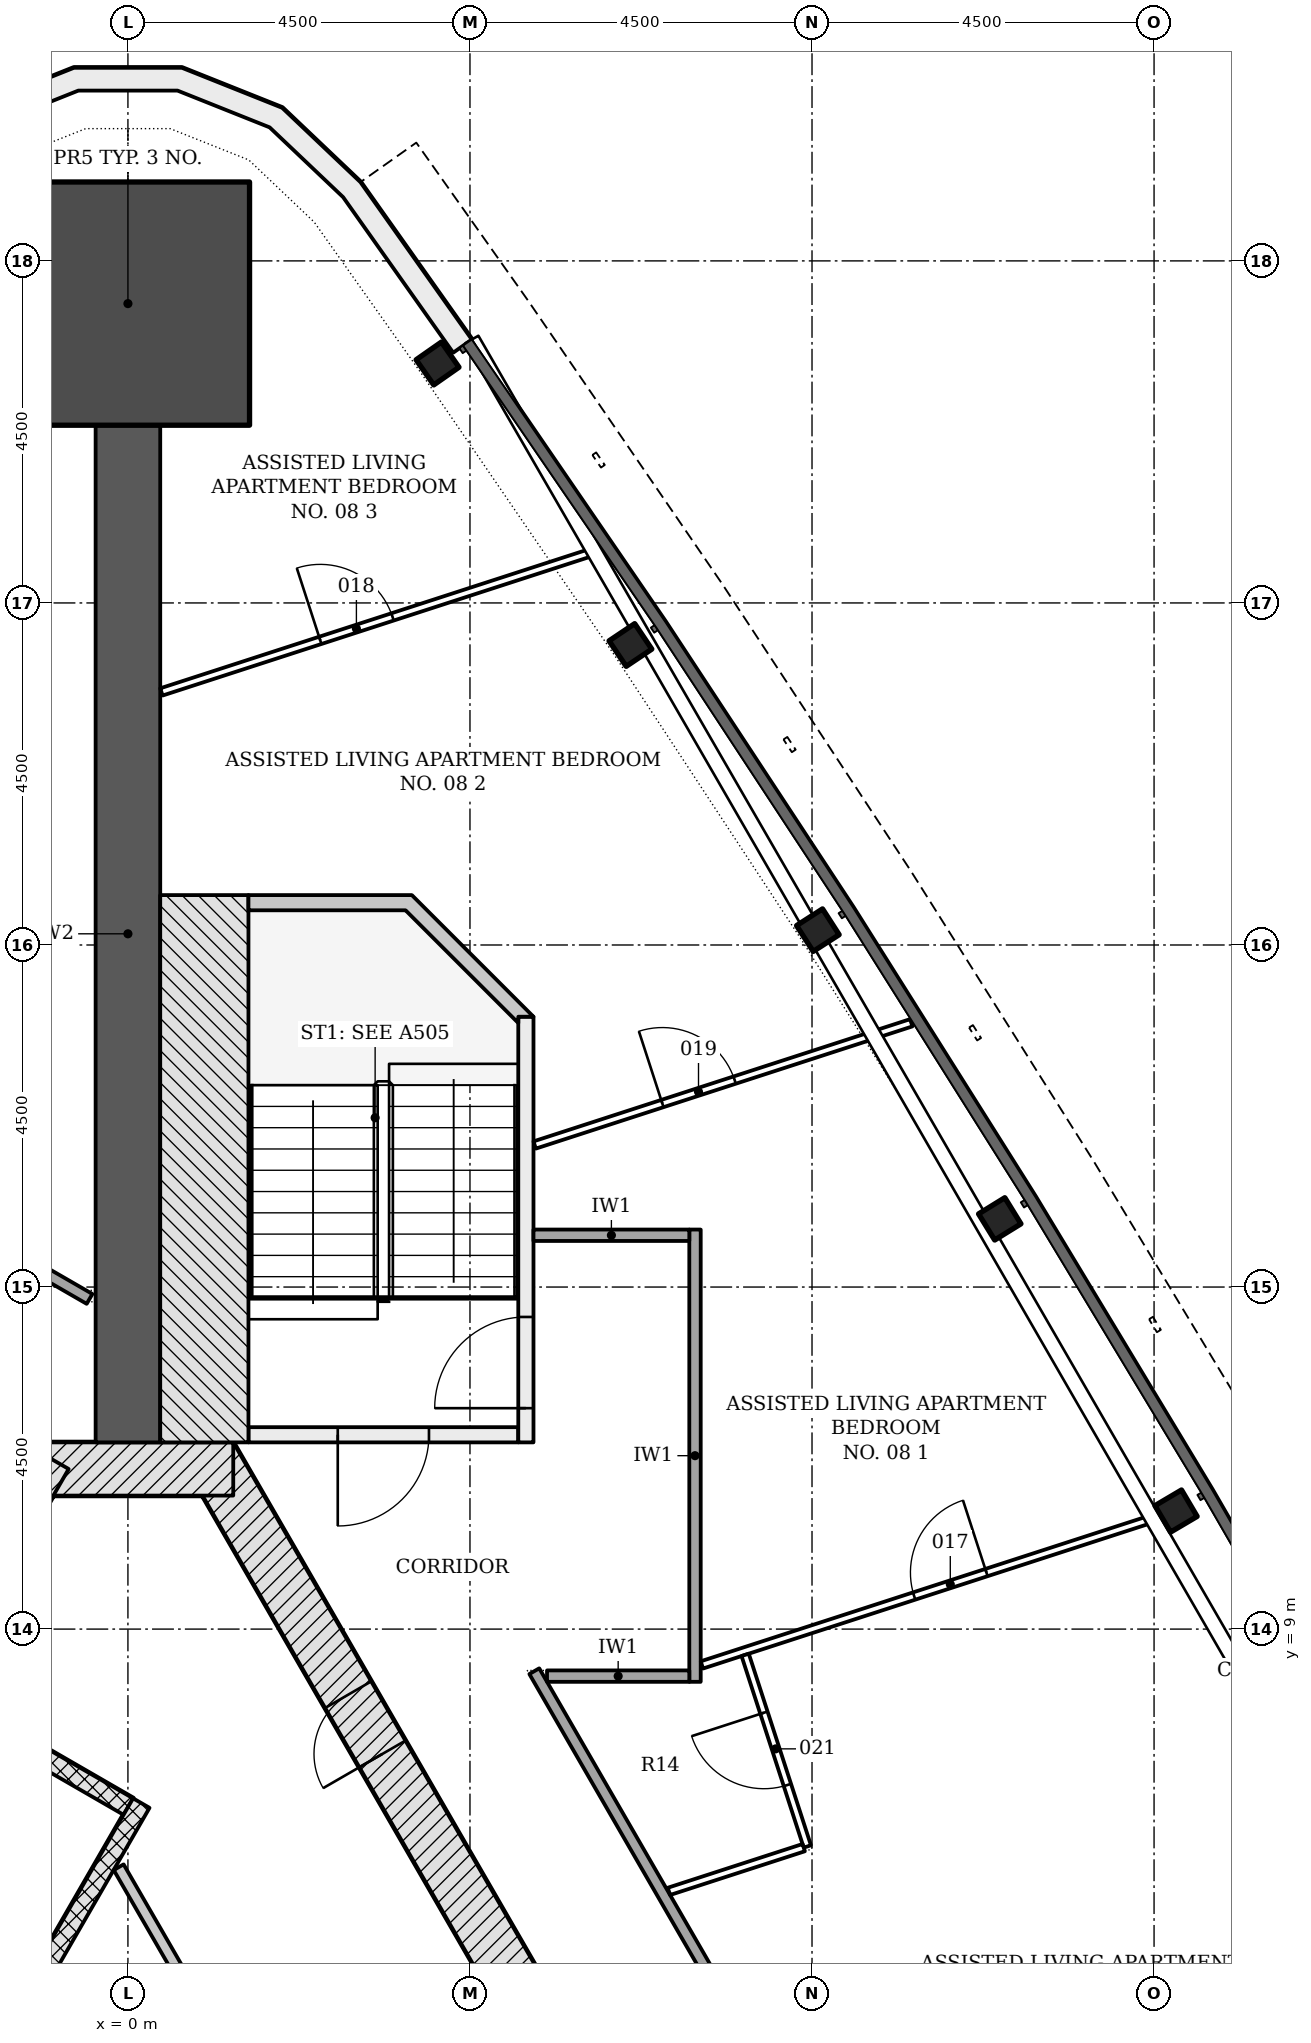
"""IFC4 building model, lengths in metres.
Left out: names, types, materials, properties, quantities, classifications, styles, units other than length and angle.
Written with IfcOpenShell. Run it as: python <this file> out.ifc"""

import sys

from ifc_helpers import new_model, si_unit, direction, frame, frame_2d, origin, origin_2d, place, context, subcontext, project, spatial, polyline, rectangle, i_section, outline, extrude, element, fill, save


model = new_model("IFC4")
c1 = context("Model", 3, precision=1e-05, world=origin(), true_north=direction((0.0, 1.0)))
c2 = subcontext(c1, "Body", "Model", "MODEL_VIEW")
j1 = project(units=[si_unit("LENGTHUNIT", "METRE"), si_unit("PLANEANGLEUNIT", "RADIAN")], contexts=[c1])
p1 = place(None, origin())
s1 = spatial("IfcSite", under=j1, at=p1, CompositionType="ELEMENT")
p2 = place(p1, origin())
s2 = spatial("IfcBuilding", under=s1, at=p2, CompositionType="ELEMENT")
p3 = place(p2, frame((0.0, 0.0, 72.6)))
s3 = spatial("IfcBuildingStorey", under=s2, at=p3, CompositionType="ELEMENT", Elevation=72.6)
p4 = place(p3, frame((10.311, -4.703, -0.2), z_axis=(0.0, 0.0, 1.0), x_axis=(-0.500001446645, 0.866024568562, 0.0)))
e1 = element("IfcWall", 1, at=p4, inside=s3, PredefinedType="SHEAR", context=c2, shape_type="SweptSolid", body=[
    extrude(rectangle(XDim=18.458, YDim=0.7, at=frame_2d((9.229, 0.0))), origin(), (0.0, 0.0, 1.0), 3.6),
])
p5 = place(p4, frame((9.5, 0.0, 0.2)))
e2 = element("IfcOpeningElement", 2, at=p5, cuts=e1, PredefinedType="OPENING", context=c2, shape_type="SweptSolid", body=[
    extrude(rectangle(XDim=1.0, YDim=2.1, at=frame_2d((0.5, 1.05))), frame((0.0, 0.36, 0.0), z_axis=(0.0, -1.0, 0.0), x_axis=(1.0, 0.0, 0.0)), (0.0, 0.0, 1.0), 0.72),
])
p6 = place(p4, frame((4.402, 0.0, 0.2)))
e3 = element("IfcOpeningElement", 3, at=p6, cuts=e1, PredefinedType="OPENING", context=c2, shape_type="SweptSolid", body=[
    extrude(rectangle(XDim=0.9, YDim=2.1, at=frame_2d((0.45, 1.05))), frame((0.0, 0.36, 0.0), z_axis=(0.0, -1.0, 0.0), x_axis=(1.0, 0.0, 0.0)), (0.0, 0.0, 1.0), 0.72),
])
p7 = place(p4, frame((13.927, 0.0, 0.2)))
e4 = element("IfcOpeningElement", 4, at=p7, cuts=e1, PredefinedType="OPENING", context=c2, shape_type="SweptSolid", body=[
    extrude(rectangle(XDim=0.9, YDim=2.1, at=frame_2d((0.45, 1.05))), frame((0.0, 0.36, 0.0), z_axis=(0.0, -1.0, 0.0), x_axis=(1.0, 0.0, 0.0)), (0.0, 0.0, 1.0), 0.72),
])
p8 = place(p3, frame((1.386, 11.106, -0.2), z_axis=(0.0, 0.0, 1.0), x_axis=(-1.0, 0.0, 0.0)))
e5 = element("IfcWall", 5, at=p8, inside=s3, PredefinedType="SHEAR", context=c2, shape_type="SweptSolid", body=[
    extrude(rectangle(XDim=2.771, YDim=0.7, at=frame_2d((1.386, 0.0))), origin(), (0.0, 0.0, 1.0), 3.6),
])
p9 = place(p3, frame((-1.083, 11.281, -0.2), z_axis=(0.0, 0.0, 1.0), x_axis=(-0.500001446645, -0.866024568562, 0.0)))
e6 = element("IfcWall", 6, at=p9, inside=s3, PredefinedType="SHEAR", context=c2, shape_type="SweptSolid", body=[
    extrude(rectangle(XDim=18.458, YDim=0.7, at=frame_2d((9.229, 0.0))), origin(), (0.0, 0.0, 1.0), 3.6),
])
p10 = place(p9, frame((8.979, 0.0, 0.2)))
e7 = element("IfcOpeningElement", 7, at=p10, cuts=e6, PredefinedType="OPENING", context=c2, shape_type="SweptSolid", body=[
    extrude(rectangle(XDim=1.2, YDim=2.1, at=frame_2d((0.6, 1.05))), frame((0.0, 0.36, 0.0), z_axis=(0.0, -1.0, 0.0), x_axis=(1.0, 0.0, 0.0)), (0.0, 0.0, 1.0), 0.72),
])
p11 = place(p9, frame((11.029, 0.0, 0.2)))
e8 = element("IfcOpeningElement", 8, at=p11, cuts=e6, PredefinedType="OPENING", context=c2, shape_type="SweptSolid", body=[
    extrude(rectangle(XDim=1.2, YDim=2.1, at=frame_2d((0.6, 1.05))), frame((0.0, 0.36, 0.0), z_axis=(0.0, -1.0, 0.0), x_axis=(1.0, 0.0, 0.0)), (0.0, 0.0, 1.0), 0.72),
])
p12 = place(p3, frame((0.0, 11.456, -0.2), z_axis=(0.0, 0.0, 1.0), x_axis=(0.0, 1.0, 0.0)))
e9 = element("IfcWall", 9, at=p12, inside=s3, PredefinedType="SHEAR", context=c2, shape_type="SweptSolid", body=[
    extrude(rectangle(XDim=13.382, YDim=0.85, at=frame_2d((6.691, 0.0))), origin(), (0.0, 0.0, 1.0), 3.6),
])
p13 = place(p3, frame((0.0, 26.438, -0.2), z_axis=(0.0, 0.0, 1.0), x_axis=(0.0, 1.0, 0.0)))
e10 = element("IfcColumn", 10, at=p13, inside=s3, PredefinedType="COLUMN", context=c2, shape_type="SweptSolid", body=[
    extrude(rectangle(XDim=3.2, YDim=3.2, at=origin_2d()), origin(), (0.0, 0.0, 1.0), 3.6),
])
for number, where, z_axis, x_axis in (
    (11, (13.789, 10.553, -0.2), (0.0, 0.0, 1.0), (-0.508, 0.861, 0.0)),
    (12, (11.47, 14.397, -0.2), (0.0, 0.0, 1.0), (-0.525, 0.851, 0.0)),
    (13, (9.077, 18.195, -0.2), (0.0, 0.0, 1.0), (-0.541, 0.841, 0.0)),
    (14, (6.611, 21.947, -0.2), (0.0, 0.0, 1.0), (-0.557, 0.83, 0.0)),
    (15, (4.073, 25.65, -0.2), (0.0, 0.0, 1.0), (-0.573, 0.819, 0.0)),
):
    element("IfcColumn", number, at=place(p3, frame(where, z_axis=z_axis, x_axis=x_axis)), inside=s3, PredefinedType="COLUMN", context=c2, shape_type="SweptSolid", body=[
        extrude(i_section(OverallWidth=0.404, OverallDepth=0.406, WebThickness=0.027, FlangeThickness=0.044, FilletRadius=0.015, at=origin_2d()), origin(), (0.0, 0.0, 1.0), 3.6),
    ])
p14 = place(p3, origin())
e16 = element("IfcWall", 16, at=p14, inside=s3, PredefinedType="NOTDEFINED", context=c2, shape_type="SweptSolid", body=[
    extrude(outline(polyline([(4.524, 25.965), (3.059, 28.036), (2.029, 29.014), (0.71, 29.54), (-0.71, 29.54), (-2.029, 29.014), (-3.059, 28.036), (-4.524, 25.965), (-4.279, 25.792), (-2.831, 27.839), (-1.865, 28.757), (-0.652, 29.24), (0.652, 29.24), (1.865, 28.757), (2.831, 27.839), (4.279, 25.792), (4.524, 25.965)])), origin(), (0.0, 0.0, 1.0), 3.3),
])
p15 = place(p3, frame((-2.506, 8.115, -0.2), z_axis=(0.0, 0.0, 1.0), x_axis=(0.865996321171, -0.50005036918, 0.0)))
e17 = element("IfcWall", 17, at=p15, inside=s3, PredefinedType="PARTITIONING", context=c2, shape_type="SweptSolid", body=[
    extrude(rectangle(XDim=2.9, YDim=0.25, at=frame_2d((1.45, 0.0))), origin(), (0.0, 0.0, 1.0), 3.6),
])
p16 = place(p3, frame((0.176, 6.711, 0.0), z_axis=(0.0, 0.0, 1.0), x_axis=(-0.500004227369, -0.866022963098, 0.0)))
e18 = element("IfcWall", 18, at=p16, inside=s3, PredefinedType="PARTITIONING", context=c2, shape_type="SweptSolid", body=[
    extrude(rectangle(XDim=11.8, YDim=0.25, at=frame_2d((5.9, 0.0))), origin(), (0.0, 0.0, 1.0), 3.4),
])
p17 = place(p3, frame((1.526, 3.013, 0.0), z_axis=(0.0, 0.0, 1.0), x_axis=(-0.499978925887, 0.866037570588, 0.0)))
e19 = element("IfcWall", 19, at=p17, inside=s3, PredefinedType="PARTITIONING", context=c2, shape_type="SweptSolid", body=[
    extrude(rectangle(XDim=3.296, YDim=0.15, at=frame_2d((1.648, 0.0))), origin(), (0.0, 0.0, 1.0), 3.4),
])
p18 = place(p3, frame((5.135, 11.556, -0.2), z_axis=(0.0, 0.0, 1.0), x_axis=(-1.0, 0.0, 0.0)))
e20 = element("IfcWall", 20, at=p18, inside=s3, PredefinedType="SHEAR", context=c2, shape_type="SweptSolid", body=[
    extrude(rectangle(XDim=3.55, YDim=0.2, at=frame_2d((1.775, 0.0))), origin(), (0.0, 0.0, 1.0), 3.6),
])
p19 = place(p18, frame((1.175, 0.0, 0.2)))
e21 = element("IfcOpeningElement", 21, at=p19, cuts=e20, PredefinedType="OPENING", context=c2, shape_type="SweptSolid", body=[
    extrude(rectangle(XDim=1.2, YDim=2.1, at=frame_2d((0.6, 1.05))), frame((0.0, 0.11, 0.0), z_axis=(0.0, -1.0, 0.0), x_axis=(1.0, 0.0, 0.0)), (0.0, 0.0, 1.0), 0.22),
])
p20 = place(p3, frame((5.236, 11.456, -0.2), z_axis=(0.0, 0.0, 1.0), x_axis=(0.0, 1.0, 0.0)))
e22 = element("IfcWall", 22, at=p20, inside=s3, PredefinedType="SHEAR", context=c2, shape_type="SweptSolid", body=[
    extrude(rectangle(XDim=5.6, YDim=0.2, at=frame_2d((2.8, 0.0))), origin(), (0.0, 0.0, 1.0), 3.6),
])
p21 = place(p20, frame((0.45, 0.0, 0.2)))
e23 = element("IfcOpeningElement", 23, at=p21, cuts=e22, PredefinedType="OPENING", context=c2, shape_type="SweptSolid", body=[
    extrude(rectangle(XDim=1.2, YDim=2.1, at=frame_2d((0.6, 1.05))), frame((0.0, 0.11, 0.0), z_axis=(0.0, -1.0, 0.0), x_axis=(1.0, 0.0, 0.0)), (0.0, 0.0, 1.0), 0.22),
])
p22 = place(p3, frame((1.005, 11.456, -0.2), z_axis=(0.0, 0.0, 1.0), x_axis=(0.0, 1.0, 0.0)))
e24 = element("IfcWall", 24, at=p22, inside=s3, PredefinedType="SHEAR", context=c2, shape_type="SweptSolid", body=[
    extrude(rectangle(XDim=7.2, YDim=1.161, at=frame_2d((3.6, 0.0))), origin(), (0.0, 0.0, 1.0), 3.6),
])
p23 = place(p3, frame((0.0, 0.0, -0.2)))
e25 = element("IfcWall", 25, at=p23, inside=s3, PredefinedType="SHEAR", context=c2, shape_type="SweptSolid", body=[
    extrude(outline(polyline([(5.336, 17.056), (3.736, 18.656), (1.586, 18.656), (1.586, 18.456), (3.653, 18.456), (5.135, 16.974), (5.135, 17.056), (5.135, 17.056), (5.135, 17.056), (5.135, 17.056), (5.135, 17.056), (5.135, 17.056), (5.135, 17.056), (5.135, 17.056), (5.135, 17.056), (5.135, 17.056), (5.135, 17.056), (5.135, 17.056), (5.135, 17.056), (5.135, 17.056), (5.135, 17.056), (5.135, 17.056), (5.135, 17.056), (5.336, 17.056)])), origin(), (0.0, 0.0, 1.0), 3.6),
])
p24 = place(p3, frame((5.346, 8.446, 0.0), z_axis=(0.0, 0.0, 1.0), x_axis=(0.500008781656, -0.866020333634, 0.0)))
e26 = element("IfcWall", 26, at=p24, inside=s3, PredefinedType="PARTITIONING", context=c2, shape_type="SweptSolid", body=[
    extrude(rectangle(XDim=15.057, YDim=0.15, at=frame_2d((7.528, 0.0))), origin(), (0.0, 0.0, 1.0), 2.778),
])
p25 = place(p24, frame((12.55, 0.0, 0.0)))
e27 = element("IfcOpeningElement", 27, at=p25, cuts=e26, PredefinedType="OPENING", context=c2, shape_type="SweptSolid", body=[
    extrude(rectangle(XDim=1.0, YDim=2.1, at=frame_2d((0.5, 1.05))), frame((0.0, 0.085, 0.0), z_axis=(0.0, -1.0, 0.0), x_axis=(1.0, 0.0, 0.0)), (0.0, 0.0, 1.0), 0.17),
])
p26 = place(p24, frame((6.753, 0.0, 0.0)))
e28 = element("IfcOpeningElement", 28, at=p26, cuts=e26, PredefinedType="OPENING", context=c2, shape_type="SweptSolid", body=[
    extrude(rectangle(XDim=1.0, YDim=2.1, at=frame_2d((0.5, 1.05))), frame((0.0, 0.085, 0.0), z_axis=(0.0, -1.0, 0.0), x_axis=(1.0, 0.0, 0.0)), (0.0, 0.0, 1.0), 0.17),
])
p27 = place(p3, frame((7.461, 8.306, 0.0), z_axis=(0.0, 0.0, 1.0), x_axis=(0.0, 1.0, 0.0)))
e29 = element("IfcWall", 29, at=p27, inside=s3, PredefinedType="PARTITIONING", context=c2, shape_type="SweptSolid", body=[
    extrude(rectangle(XDim=5.95, YDim=0.15, at=frame_2d((2.975, 0.0))), origin(), (0.0, 0.0, 1.0), 2.778),
])
p28 = place(p3, frame((-5.111, 16.003, 0.0), z_axis=(0.0, 0.0, 1.0), x_axis=(0.866034245675, -0.499984685083, 0.0)))
e30 = element("IfcWall", 30, at=p28, inside=s3, PredefinedType="PARTITIONING", context=c2, shape_type="SweptSolid", body=[
    extrude(rectangle(XDim=5.319, YDim=0.15, at=frame_2d((2.66, 0.0))), origin(), (0.0, 0.0, 1.0), 3.4),
])
p29 = place(p28, frame((2.084, 0.0, 0.0)))
e31 = element("IfcOpeningElement", 31, at=p29, cuts=e30, PredefinedType="OPENING", context=c2, shape_type="SweptSolid", body=[
    extrude(rectangle(XDim=1.0, YDim=2.1, at=frame_2d((0.5, 1.05))), frame((0.0, 0.085, 0.0), z_axis=(0.0, -1.0, 0.0), x_axis=(1.0, 0.0, 0.0)), (0.0, 0.0, 1.0), 0.17),
])
p30 = place(p3, frame((5.336, 14.181, 0.0), z_axis=(0.0, 0.0, 1.0), x_axis=(1.0, 0.0, 0.0)))
e32 = element("IfcWall", 32, at=p30, inside=s3, PredefinedType="PARTITIONING", context=c2, shape_type="SweptSolid", body=[
    extrude(rectangle(XDim=2.05, YDim=0.15, at=frame_2d((1.025, 0.0))), origin(), (0.0, 0.0, 1.0), 3.4),
])
p31 = place(p3, frame((5.514, 8.381, 0.0), z_axis=(0.0, 0.0, 1.0), x_axis=(1.0, 0.0, 0.0)))
e33 = element("IfcWall", 33, at=p31, inside=s3, PredefinedType="PARTITIONING", context=c2, shape_type="SweptSolid", body=[
    extrude(rectangle(XDim=1.872, YDim=0.15, at=frame_2d((0.936, 0.0))), origin(), (0.0, 0.0, 1.0), 3.4),
])
p32 = place(p3, frame((7.551, 8.529, 0.0), z_axis=(0.0, 0.0, 1.0), x_axis=(0.951171490306, 0.308662916511, 0.0)))
e34 = element("IfcWall", 34, at=p32, inside=s3, PredefinedType="PARTITIONING", context=c2, shape_type="SweptSolid", body=[
    extrude(rectangle(XDim=6.302, YDim=0.1, at=frame_2d((3.151, 0.0))), origin(), (0.0, 0.0, 1.0), 2.778),
])
p33 = place(p32, frame((2.936, 0.0, 0.0)))
e35 = element("IfcOpeningElement", 35, at=p33, cuts=e34, PredefinedType="OPENING", context=c2, shape_type="SweptSolid", body=[
    extrude(rectangle(XDim=1.0, YDim=2.1, at=frame_2d((0.5, 1.05))), frame((0.0, 0.06, 0.0), z_axis=(0.0, -1.0, 0.0), x_axis=(1.0, 0.0, 0.0)), (0.0, 0.0, 1.0), 0.12),
])
p34 = place(p3, frame((0.44, 21.329, 0.0), z_axis=(0.0, 0.0, 1.0), x_axis=(0.951171830883, 0.308661866992, 0.0)))
e36 = element("IfcWall", 36, at=p34, inside=s3, PredefinedType="PARTITIONING", context=c2, shape_type="SweptSolid", body=[
    extrude(rectangle(XDim=6.078, YDim=0.1, at=frame_2d((3.039, 0.0))), origin(), (0.0, 0.0, 1.0), 2.974),
])
p35 = place(p34, frame((2.197, 0.0, 0.0)))
e37 = element("IfcOpeningElement", 37, at=p35, cuts=e36, PredefinedType="OPENING", context=c2, shape_type="SweptSolid", body=[
    extrude(rectangle(XDim=1.0, YDim=2.1, at=frame_2d((0.5, 1.05))), frame((0.0, 0.06, 0.0), z_axis=(0.0, -1.0, 0.0), x_axis=(1.0, 0.0, 0.0)), (0.0, 0.0, 1.0), 0.12),
])
p36 = place(p3, frame((5.351, 15.369, 0.0), z_axis=(0.0, 0.0, 1.0), x_axis=(0.951165555735, 0.308681203807, 0.0)))
e38 = element("IfcWall", 38, at=p36, inside=s3, PredefinedType="PARTITIONING", context=c2, shape_type="SweptSolid", body=[
    extrude(rectangle(XDim=5.209, YDim=0.1, at=frame_2d((2.604, 0.0))), origin(), (0.0, 0.0, 1.0), 2.974),
])
p37 = place(p36, frame((1.766, 0.0, 0.0)))
e39 = element("IfcOpeningElement", 39, at=p37, cuts=e38, PredefinedType="OPENING", context=c2, shape_type="SweptSolid", body=[
    extrude(rectangle(XDim=1.0, YDim=2.1, at=frame_2d((0.5, 1.05))), frame((0.0, 0.06, 0.0), z_axis=(0.0, -1.0, 0.0), x_axis=(1.0, 0.0, 0.0)), (0.0, 0.0, 1.0), 0.12),
])
p38 = place(p3, frame((8.938, 6.14, 0.0), z_axis=(0.0, 0.0, 1.0), x_axis=(-0.308644385593, 0.951177503541, 0.0)))
e40 = element("IfcWall", 40, at=p38, inside=s3, PredefinedType="PARTITIONING", context=c2, shape_type="SweptSolid", body=[
    extrude(rectangle(XDim=2.65, YDim=0.1, at=frame_2d((1.325, 0.0))), origin(), (0.0, 0.0, 1.0), 2.778),
])
p39 = place(p38, frame((0.85, 0.0, 0.0)))
e41 = element("IfcOpeningElement", 41, at=p39, cuts=e40, PredefinedType="OPENING", context=c2, shape_type="SweptSolid", body=[
    extrude(rectangle(XDim=1.0, YDim=2.1, at=frame_2d((0.5, 1.05))), frame((0.0, 0.06, 0.0), z_axis=(0.0, -1.0, 0.0), x_axis=(1.0, 0.0, 0.0)), (0.0, 0.0, 1.0), 0.12),
])
p40 = place(p3, frame((7.117, 5.549, 0.0), z_axis=(0.0, 0.0, 1.0), x_axis=(0.951141782181, 0.308754449667, 0.0)))
e42 = element("IfcWall", 42, at=p40, inside=s3, PredefinedType="PARTITIONING", context=c2, shape_type="SweptSolid", body=[
    extrude(rectangle(XDim=1.865, YDim=0.1, at=frame_2d((0.932, 0.0))), origin(), (0.0, 0.0, 1.0), 3.4),
])
p41 = place(p7, origin())
e43 = element("IfcDoor", 43, at=p41, inside=s3, OperationType="SINGLE_SWING_LEFT", PredefinedType="DOOR", context=c2, shape_type="SweptSolid", body=[
    extrude(rectangle(XDim=0.9, YDim=2.1, at=frame_2d((0.45, 1.05))), frame((0.0, 0.075, 0.0), z_axis=(0.0, -1.0, 0.0), x_axis=(1.0, 0.0, 0.0)), (0.0, 0.0, 1.0), 0.15),
])
fill(e4, e43)
p42 = place(p19, origin())
e44 = element("IfcDoor", 44, at=p42, inside=s3, OperationType="SINGLE_SWING_RIGHT", PredefinedType="DOOR", context=c2, shape_type="SweptSolid", body=[
    extrude(rectangle(XDim=1.2, YDim=2.1, at=frame_2d((0.6, 1.05))), frame((0.0, 0.025, 0.0), z_axis=(0.0, -1.0, 0.0), x_axis=(1.0, 0.0, 0.0)), (0.0, 0.0, 1.0), 0.05),
])
fill(e21, e44)
p43 = place(p21, origin())
e45 = element("IfcDoor", 45, at=p43, inside=s3, OperationType="SINGLE_SWING_LEFT", PredefinedType="DOOR", context=c2, shape_type="SweptSolid", body=[
    extrude(rectangle(XDim=1.2, YDim=2.1, at=frame_2d((0.6, 1.05))), frame((0.0, 0.025, 0.0), z_axis=(0.0, -1.0, 0.0), x_axis=(1.0, 0.0, 0.0)), (0.0, 0.0, 1.0), 0.05),
])
fill(e23, e45)
p44 = place(p33, origin())
e46 = element("IfcDoor", 46, at=p44, inside=s3, OperationType="SINGLE_SWING_RIGHT", PredefinedType="DOOR", context=c2, shape_type="SweptSolid", body=[
    extrude(rectangle(XDim=1.0, YDim=2.1, at=frame_2d((0.5, 1.05))), frame((0.0, 0.025, 0.0), z_axis=(0.0, -1.0, 0.0), x_axis=(1.0, 0.0, 0.0)), (0.0, 0.0, 1.0), 0.05),
])
fill(e35, e46)
p45 = place(p35, origin())
e47 = element("IfcDoor", 47, at=p45, inside=s3, OperationType="SINGLE_SWING_LEFT", PredefinedType="DOOR", context=c2, shape_type="SweptSolid", body=[
    extrude(rectangle(XDim=1.0, YDim=2.1, at=frame_2d((0.5, 1.05))), frame((0.0, 0.025, 0.0), z_axis=(0.0, -1.0, 0.0), x_axis=(1.0, 0.0, 0.0)), (0.0, 0.0, 1.0), 0.05),
])
fill(e37, e47)
p46 = place(p37, origin())
e48 = element("IfcDoor", 48, at=p46, inside=s3, OperationType="SINGLE_SWING_LEFT", PredefinedType="DOOR", context=c2, shape_type="SweptSolid", body=[
    extrude(rectangle(XDim=1.0, YDim=2.1, at=frame_2d((0.5, 1.05))), frame((0.0, 0.025, 0.0), z_axis=(0.0, -1.0, 0.0), x_axis=(1.0, 0.0, 0.0)), (0.0, 0.0, 1.0), 0.05),
])
fill(e39, e48)
p47 = place(p39, origin())
e49 = element("IfcDoor", 49, at=p47, inside=s3, OperationType="SINGLE_SWING_RIGHT", PredefinedType="DOOR", context=c2, shape_type="SweptSolid", body=[
    extrude(rectangle(XDim=1.0, YDim=2.1, at=frame_2d((0.5, 1.05))), frame((0.0, 0.025, 0.0), z_axis=(0.0, -1.0, 0.0), x_axis=(1.0, 0.0, 0.0)), (0.0, 0.0, 1.0), 0.05),
])
fill(e41, e49)
save(model, sys.argv[1])
